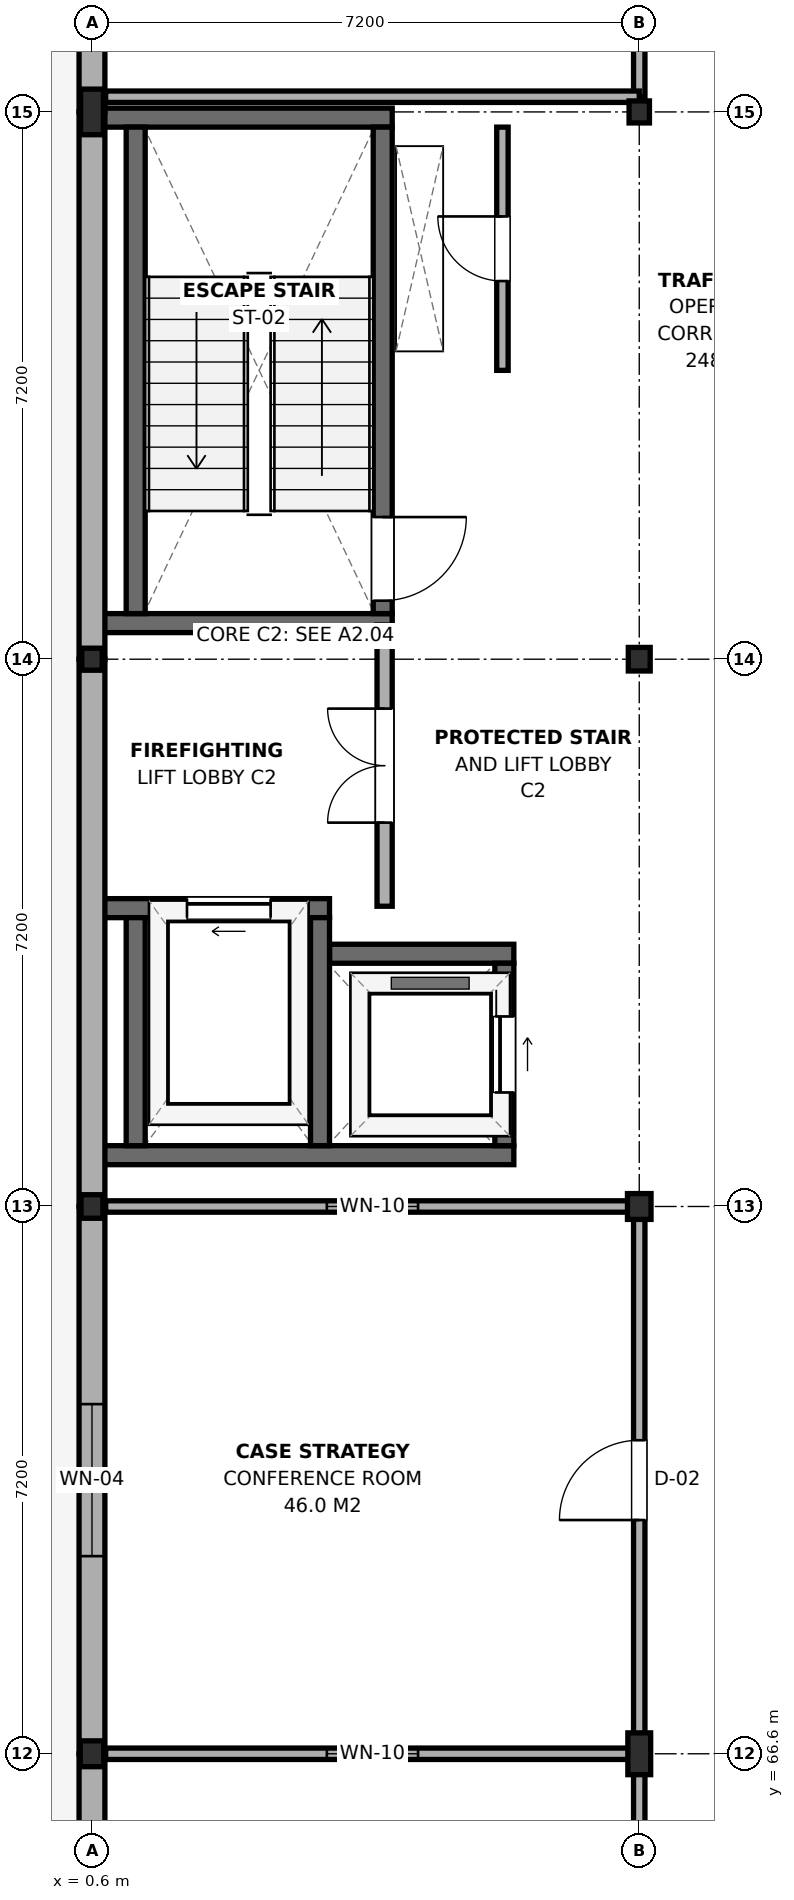
"""IFC4 building model, lengths in metres.
Left out: names, types, materials, properties, quantities, classifications, styles, units other than length and angle.
Written with IfcOpenShell. Run it as: python <this file> out.ifc"""

import sys

from ifc_helpers import new_model, si_unit, direction, frame, frame_2d, origin, origin_2d, place, context, subcontext, project, spatial, rectangle, i_section, extrude, element, fill, save


model = new_model("IFC4")
c1 = context("Model", 3, precision=1e-05, world=origin(), true_north=direction((0.0, 1.0)))
c2 = subcontext(c1, "Body", "Model", "MODEL_VIEW")
j1 = project(units=[si_unit("LENGTHUNIT", "METRE"), si_unit("PLANEANGLEUNIT", "RADIAN")], contexts=[c1])
p1 = place(None, origin())
s1 = spatial("IfcSite", under=j1, at=p1, CompositionType="ELEMENT")
p2 = place(p1, origin())
s2 = spatial("IfcBuilding", under=s1, at=p2, CompositionType="ELEMENT")
p3 = place(p2, frame((0.0, 0.0, 9.0)))
s3 = spatial("IfcBuildingStorey", under=s2, at=p3, CompositionType="ELEMENT", Elevation=9.0)
p4 = place(p3, frame((0.6, 66.6, 0.0), z_axis=(0.0, 0.0, 1.0), x_axis=(1.0, 0.0, 0.0)))
e1 = element("IfcColumn", 1, at=p4, inside=s3, PredefinedType="COLUMN", context=c2, shape_type="SweptSolid", body=[
    extrude(i_section(OverallWidth=0.31, OverallDepth=0.34, WebThickness=0.021, FlangeThickness=0.039, FilletRadius=0.027, at=origin_2d()), origin(), (0.0, 0.0, 1.0), 4.2),
])
p5 = place(p3, frame((0.6, 73.8, 0.0), z_axis=(0.0, 0.0, 1.0), x_axis=(1.0, 0.0, 0.0)))
e2 = element("IfcColumn", 2, at=p5, inside=s3, PredefinedType="COLUMN", context=c2, shape_type="SweptSolid", body=[
    extrude(i_section(OverallWidth=0.288, OverallDepth=0.31, WebThickness=0.019, FlangeThickness=0.033, FilletRadius=0.024, at=origin_2d()), origin(), (0.0, 0.0, 1.0), 4.2),
])
p6 = place(p3, frame((0.6, 81.0, 0.0), z_axis=(0.0, 0.0, 1.0), x_axis=(1.0, 0.0, 0.0)))
e3 = element("IfcColumn", 3, at=p6, inside=s3, PredefinedType="COLUMN", context=c2, shape_type="SweptSolid", body=[
    extrude(i_section(OverallWidth=0.268, OverallDepth=0.29, WebThickness=0.018, FlangeThickness=0.032, FilletRadius=0.024, at=origin_2d()), origin(), (0.0, 0.0, 1.0), 4.2),
])
p7 = place(p3, frame((0.6, 88.2, 0.0), z_axis=(0.0, 0.0, 1.0), x_axis=(1.0, 0.0, 0.0)))
e4 = element("IfcColumn", 4, at=p7, inside=s3, PredefinedType="COLUMN", context=c2, shape_type="SweptSolid", body=[
    extrude(i_section(OverallWidth=0.3, OverallDepth=0.6, WebThickness=0.015, FlangeThickness=0.03, FilletRadius=0.027, at=origin_2d()), origin(), (0.0, 0.0, 1.0), 4.2),
])
p8 = place(p3, frame((7.8, 66.6, 0.0), z_axis=(0.0, 0.0, 1.0), x_axis=(1.0, 0.0, 0.0)))
e5 = element("IfcColumn", 5, at=p8, inside=s3, PredefinedType="COLUMN", context=c2, shape_type="SweptSolid", body=[
    extrude(i_section(OverallWidth=0.3, OverallDepth=0.55, WebThickness=0.015, FlangeThickness=0.029, FilletRadius=0.027, at=origin_2d()), origin(), (0.0, 0.0, 1.0), 4.2),
])
p9 = place(p3, frame((7.8, 73.8, 0.0), z_axis=(0.0, 0.0, 1.0), x_axis=(1.0, 0.0, 0.0)))
e6 = element("IfcColumn", 6, at=p9, inside=s3, PredefinedType="COLUMN", context=c2, shape_type="SweptSolid", body=[
    extrude(i_section(OverallWidth=0.31, OverallDepth=0.34, WebThickness=0.021, FlangeThickness=0.039, FilletRadius=0.027, at=origin_2d()), origin(), (0.0, 0.0, 1.0), 4.2),
])
p10 = place(p3, frame((7.8, 81.0, 0.0), z_axis=(0.0, 0.0, 1.0), x_axis=(1.0, 0.0, 0.0)))
e7 = element("IfcColumn", 7, at=p10, inside=s3, PredefinedType="COLUMN", context=c2, shape_type="SweptSolid", body=[
    extrude(i_section(OverallWidth=0.288, OverallDepth=0.31, WebThickness=0.019, FlangeThickness=0.033, FilletRadius=0.024, at=origin_2d()), origin(), (0.0, 0.0, 1.0), 4.2),
])
p11 = place(p3, frame((7.8, 88.2, 0.0), z_axis=(0.0, 0.0, 1.0), x_axis=(1.0, 0.0, 0.0)))
e8 = element("IfcColumn", 8, at=p11, inside=s3, PredefinedType="COLUMN", context=c2, shape_type="SweptSolid", body=[
    extrude(i_section(OverallWidth=0.268, OverallDepth=0.29, WebThickness=0.018, FlangeThickness=0.032, FilletRadius=0.024, at=origin_2d()), origin(), (0.0, 0.0, 1.0), 4.2),
])
for number, where, z_axis, x_axis in (
    (9, (0.75, 81.475, 0.0), (0.0, 0.0, 1.0), (1.0, 0.0, 0.0)),
    (10, (0.75, 88.125, 0.0), (0.0, 0.0, 1.0), (1.0, 0.0, 0.0)),
):
    element("IfcWall", number, at=place(p3, frame(where, z_axis=z_axis, x_axis=x_axis)), inside=s3, PredefinedType="SHEAR", context=c2, shape_type="SweptSolid", body=[
        extrude(rectangle(XDim=3.8, YDim=0.25, at=frame_2d((1.9, 0.0))), origin(), (0.0, 0.0, 1.0), 3.98),
    ])
p12 = place(p3, frame((1.175, 81.6, 0.0), z_axis=(0.0, 0.0, 1.0), x_axis=(0.0, 1.0, 0.0)))
e11 = element("IfcWall", 11, at=p12, inside=s3, PredefinedType="SHEAR", context=c2, shape_type="SweptSolid", body=[
    extrude(rectangle(XDim=6.4, YDim=0.25, at=frame_2d((3.2, 0.0))), origin(), (0.0, 0.0, 1.0), 3.98),
])
p13 = place(p3, frame((4.425, 81.6, 0.0), z_axis=(0.0, 0.0, 1.0), x_axis=(0.0, 1.0, 0.0)))
e12 = element("IfcWall", 12, at=p13, inside=s3, PredefinedType="SHEAR", context=c2, shape_type="SweptSolid", body=[
    extrude(rectangle(XDim=6.4, YDim=0.25, at=frame_2d((3.2, 0.0))), origin(), (0.0, 0.0, 1.0), 3.98),
])
p14 = place(p13, frame((0.17, 0.0, 0.0)))
e13 = element("IfcOpeningElement", 13, at=p14, cuts=e12, PredefinedType="OPENING", context=c2, shape_type="SweptSolid", body=[
    extrude(rectangle(XDim=1.1, YDim=2.15, at=frame_2d((0.55, 1.075))), frame((0.0, 0.14, 0.0), z_axis=(0.0, -1.0, 0.0), x_axis=(1.0, 0.0, 0.0)), (0.0, 0.0, 1.0), 0.28),
])
p15 = place(p3, frame((0.75, 74.475, 0.0), z_axis=(0.0, 0.0, 1.0), x_axis=(1.0, 0.0, 0.0)))
e14 = element("IfcWall", 14, at=p15, inside=s3, PredefinedType="SHEAR", context=c2, shape_type="SweptSolid", body=[
    extrude(rectangle(XDim=5.4, YDim=0.25, at=frame_2d((2.7, 0.0))), origin(), (0.0, 0.0, 1.0), 3.98),
])
p16 = place(p3, frame((0.75, 77.725, 0.0), z_axis=(0.0, 0.0, 1.0), x_axis=(1.0, 0.0, 0.0)))
e15 = element("IfcWall", 15, at=p16, inside=s3, PredefinedType="SHEAR", context=c2, shape_type="SweptSolid", body=[
    extrude(rectangle(XDim=2.975, YDim=0.25, at=frame_2d((1.488, 0.0))), origin(), (0.0, 0.0, 1.0), 3.98),
])
p17 = place(p16, frame((1.1, 0.0, 0.0)))
e16 = element("IfcOpeningElement", 16, at=p17, cuts=e15, PredefinedType="OPENING", context=c2, shape_type="SweptSolid", body=[
    extrude(rectangle(XDim=1.1, YDim=2.15, at=frame_2d((0.55, 1.075))), frame((0.0, 0.14, 0.0), z_axis=(0.0, -1.0, 0.0), x_axis=(1.0, 0.0, 0.0)), (0.0, 0.0, 1.0), 0.28),
])
p18 = place(p3, frame((3.725, 77.125, 0.0), z_axis=(0.0, 0.0, 1.0), x_axis=(1.0, 0.0, 0.0)))
e17 = element("IfcWall", 17, at=p18, inside=s3, PredefinedType="SHEAR", context=c2, shape_type="SweptSolid", body=[
    extrude(rectangle(XDim=2.425, YDim=0.25, at=frame_2d((1.212, 0.0))), origin(), (0.0, 0.0, 1.0), 3.98),
])
for number, where, z_axis, x_axis in (
    (18, (1.175, 74.6, 0.0), (0.0, 0.0, 1.0), (0.0, 1.0, 0.0)),
    (19, (3.6, 74.6, 0.0), (0.0, 0.0, 1.0), (0.0, 1.0, 0.0)),
):
    element("IfcWall", number, at=place(p3, frame(where, z_axis=z_axis, x_axis=x_axis)), inside=s3, PredefinedType="SHEAR", context=c2, shape_type="SweptSolid", body=[
        extrude(rectangle(XDim=3.0, YDim=0.25, at=frame_2d((1.5, 0.0))), origin(), (0.0, 0.0, 1.0), 3.98),
    ])
p19 = place(p3, frame((6.025, 74.6, 0.0), z_axis=(0.0, 0.0, 1.0), x_axis=(0.0, 1.0, 0.0)))
e20 = element("IfcWall", 20, at=p19, inside=s3, PredefinedType="SHEAR", context=c2, shape_type="SweptSolid", body=[
    extrude(rectangle(XDim=2.4, YDim=0.25, at=frame_2d((1.2, 0.0))), origin(), (0.0, 0.0, 1.0), 3.98),
])
p20 = place(p19, frame((0.7, 0.0, 0.0)))
e21 = element("IfcOpeningElement", 21, at=p20, cuts=e20, PredefinedType="OPENING", context=c2, shape_type="SweptSolid", body=[
    extrude(rectangle(XDim=1.0, YDim=2.15, at=frame_2d((0.5, 1.075))), frame((0.0, 0.14, 0.0), z_axis=(0.0, -1.0, 0.0), x_axis=(1.0, 0.0, 0.0)), (0.0, 0.0, 1.0), 0.28),
])
p21 = place(p3, frame((0.6, 58.8, 0.0), z_axis=(0.0, 0.0, 1.0), x_axis=(0.0, 1.0, 0.0)))
e22 = element("IfcWall", 22, at=p21, inside=s3, PredefinedType="SOLIDWALL", context=c2, shape_type="SweptSolid", body=[
    extrude(rectangle(XDim=7.8, YDim=0.34, at=frame_2d((3.9, 0.0))), origin(), (0.0, 0.0, 1.0), 3.625),
])
p22 = place(p21, frame((2.9, 0.0, 0.9)))
e23 = element("IfcOpeningElement", 23, at=p22, cuts=e22, PredefinedType="OPENING", context=c2, shape_type="SweptSolid", body=[
    extrude(rectangle(XDim=2.0, YDim=1.8, at=frame_2d((1.0, 0.9))), frame((0.0, 0.185, 0.0), z_axis=(0.0, -1.0, 0.0), x_axis=(1.0, 0.0, 0.0)), (0.0, 0.0, 1.0), 0.37),
])
p23 = place(p3, frame((0.6, 66.6, 0.0), z_axis=(0.0, 0.0, 1.0), x_axis=(0.0, 1.0, 0.0)))
e24 = element("IfcWall", 24, at=p23, inside=s3, PredefinedType="SOLIDWALL", context=c2, shape_type="SweptSolid", body=[
    extrude(rectangle(XDim=7.2, YDim=0.34, at=frame_2d((3.6, 0.0))), origin(), (0.0, 0.0, 1.0), 3.375),
])
p24 = place(p23, frame((2.6, 0.0, 0.9)))
e25 = element("IfcOpeningElement", 25, at=p24, cuts=e24, PredefinedType="OPENING", context=c2, shape_type="SweptSolid", body=[
    extrude(rectangle(XDim=2.0, YDim=1.8, at=frame_2d((1.0, 0.9))), frame((0.0, 0.185, 0.0), z_axis=(0.0, -1.0, 0.0), x_axis=(1.0, 0.0, 0.0)), (0.0, 0.0, 1.0), 0.37),
])
for number, where, z_axis, x_axis in (
    (26, (0.6, 73.8, 0.0), (0.0, 0.0, 1.0), (0.0, 1.0, 0.0)),
    (27, (0.6, 81.0, 0.0), (0.0, 0.0, 1.0), (0.0, 1.0, 0.0)),
):
    element("IfcWall", number, at=place(p3, frame(where, z_axis=z_axis, x_axis=x_axis)), inside=s3, PredefinedType="SOLIDWALL", context=c2, shape_type="SweptSolid", body=[
        extrude(rectangle(XDim=7.2, YDim=0.34, at=frame_2d((3.6, 0.0))), origin(), (0.0, 0.0, 1.0), 3.375),
    ])
p25 = place(p3, frame((0.6, 88.2, 0.0), z_axis=(0.0, 0.0, 1.0), x_axis=(0.0, 1.0, 0.0)))
e28 = element("IfcWall", 28, at=p25, inside=s3, PredefinedType="SOLIDWALL", context=c2, shape_type="SweptSolid", body=[
    extrude(rectangle(XDim=7.8, YDim=0.34, at=frame_2d((3.9, 0.0))), origin(), (0.0, 0.0, 1.0), 3.475),
])
p26 = place(p3, frame((4.45, 77.75, 0.0), z_axis=(0.0, 0.0, 1.0), x_axis=(0.0, 1.0, 0.0)))
e29 = element("IfcWall", 29, at=p26, inside=s3, PredefinedType="PARTITIONING", context=c2, shape_type="SweptSolid", body=[
    extrude(rectangle(XDim=3.7, YDim=0.2, at=frame_2d((1.85, 0.0))), origin(), (0.0, 0.0, 1.0), 3.425),
])
p27 = place(p26, frame((1.1, 0.0, 0.0)))
e30 = element("IfcOpeningElement", 30, at=p27, cuts=e29, PredefinedType="OPENING", context=c2, shape_type="SweptSolid", body=[
    extrude(rectangle(XDim=1.5, YDim=2.15, at=frame_2d((0.75, 1.075))), frame((0.0, 0.115, 0.0), z_axis=(0.0, -1.0, 0.0), x_axis=(1.0, 0.0, 0.0)), (0.0, 0.0, 1.0), 0.23),
])
p28 = place(p3, frame((6.0, 84.8, 0.0), z_axis=(0.0, 0.0, 1.0), x_axis=(0.0, 1.0, 0.0)))
e31 = element("IfcWall", 31, at=p28, inside=s3, PredefinedType="PARTITIONING", context=c2, shape_type="SweptSolid", body=[
    extrude(rectangle(XDim=3.2, YDim=0.15, at=frame_2d((1.6, 0.0))), origin(), (0.0, 0.0, 1.0), 3.625),
])
p29 = place(p28, frame((1.175, 0.0, 0.0)))
e32 = element("IfcOpeningElement", 32, at=p29, cuts=e31, PredefinedType="OPENING", context=c2, shape_type="SweptSolid", body=[
    extrude(rectangle(XDim=0.85, YDim=2.1, at=frame_2d((0.425, 1.05))), frame((0.0, 0.09, 0.0), z_axis=(0.0, -1.0, 0.0), x_axis=(1.0, 0.0, 0.0)), (0.0, 0.0, 1.0), 0.18),
])
p30 = place(p3, frame((7.8, 40.0, 0.0), z_axis=(0.0, 0.0, 1.0), x_axis=(0.0, 1.0, 0.0)))
e33 = element("IfcWall", 33, at=p30, inside=s3, PredefinedType="PARTITIONING", context=c2, shape_type="SweptSolid", body=[
    extrude(rectangle(XDim=26.6, YDim=0.15, at=frame_2d((13.3, 0.0))), origin(), (0.0, 0.0, 1.0), 3.375),
])
p31 = place(p30, frame((13.4, 0.0, 0.0)))
e34 = element("IfcOpeningElement", 34, at=p31, cuts=e33, PredefinedType="OPENING", context=c2, shape_type="SweptSolid", body=[
    extrude(rectangle(XDim=1.6, YDim=2.15, at=frame_2d((0.8, 1.075))), frame((0.0, 0.09, 0.0), z_axis=(0.0, -1.0, 0.0), x_axis=(1.0, 0.0, 0.0)), (0.0, 0.0, 1.0), 0.18),
])
p32 = place(p3, frame((7.8, 66.6, 0.0), z_axis=(0.0, 0.0, 1.0), x_axis=(0.0, 1.0, 0.0)))
e35 = element("IfcWall", 35, at=p32, inside=s3, PredefinedType="PARTITIONING", context=c2, shape_type="SweptSolid", body=[
    extrude(rectangle(XDim=7.2, YDim=0.15, at=frame_2d((3.6, 0.0))), origin(), (0.0, 0.0, 1.0), 3.425),
])
p33 = place(p32, frame((3.075, 0.0, 0.0)))
e36 = element("IfcOpeningElement", 36, at=p33, cuts=e35, PredefinedType="OPENING", context=c2, shape_type="SweptSolid", body=[
    extrude(rectangle(XDim=1.05, YDim=2.15, at=frame_2d((0.525, 1.075))), frame((0.0, 0.09, 0.0), z_axis=(0.0, -1.0, 0.0), x_axis=(1.0, 0.0, 0.0)), (0.0, 0.0, 1.0), 0.18),
])
p34 = place(p3, frame((0.78, 66.6, 0.0), z_axis=(0.0, 0.0, 1.0), x_axis=(1.0, 0.0, 0.0)))
e37 = element("IfcWall", 37, at=p34, inside=s3, PredefinedType="PARTITIONING", context=c2, shape_type="SweptSolid", body=[
    extrude(rectangle(XDim=7.02, YDim=0.15, at=frame_2d((3.51, 0.0))), origin(), (0.0, 0.0, 1.0), 3.425),
])
p35 = place(p34, frame((2.91, 0.0, 0.95)))
e38 = element("IfcOpeningElement", 38, at=p35, cuts=e37, PredefinedType="OPENING", context=c2, shape_type="SweptSolid", body=[
    extrude(rectangle(XDim=1.2, YDim=1.5, at=frame_2d((0.6, 0.75))), frame((0.0, 0.09, 0.0), z_axis=(0.0, -1.0, 0.0), x_axis=(1.0, 0.0, 0.0)), (0.0, 0.0, 1.0), 0.18),
])
p36 = place(p3, frame((0.78, 73.8, 0.0), z_axis=(0.0, 0.0, 1.0), x_axis=(1.0, 0.0, 0.0)))
e39 = element("IfcWall", 39, at=p36, inside=s3, PredefinedType="PARTITIONING", context=c2, shape_type="SweptSolid", body=[
    extrude(rectangle(XDim=7.02, YDim=0.15, at=frame_2d((3.51, 0.0))), origin(), (0.0, 0.0, 1.0), 3.375),
])
p37 = place(p36, frame((2.91, 0.0, 0.95)))
e40 = element("IfcOpeningElement", 40, at=p37, cuts=e39, PredefinedType="OPENING", context=c2, shape_type="SweptSolid", body=[
    extrude(rectangle(XDim=1.2, YDim=1.5, at=frame_2d((0.6, 0.75))), frame((0.0, 0.09, 0.0), z_axis=(0.0, -1.0, 0.0), x_axis=(1.0, 0.0, 0.0)), (0.0, 0.0, 1.0), 0.18),
])
p38 = place(p3, frame((7.8, 88.4, 0.0), z_axis=(0.0, 0.0, 1.0), x_axis=(0.0, 1.0, 0.0)))
e41 = element("IfcWall", 41, at=p38, inside=s3, PredefinedType="PARTITIONING", context=c2, shape_type="SweptSolid", body=[
    extrude(rectangle(XDim=25.0, YDim=0.15, at=frame_2d((12.5, 0.0))), origin(), (0.0, 0.0, 1.0), 3.375),
])
p39 = place(p38, frame((11.7, 0.0, 0.0)))
e42 = element("IfcOpeningElement", 42, at=p39, cuts=e41, PredefinedType="OPENING", context=c2, shape_type="SweptSolid", body=[
    extrude(rectangle(XDim=1.6, YDim=2.15, at=frame_2d((0.8, 1.075))), frame((0.0, 0.09, 0.0), z_axis=(0.0, -1.0, 0.0), x_axis=(1.0, 0.0, 0.0)), (0.0, 0.0, 1.0), 0.18),
])
p40 = place(p38, frame((17.45, 0.0, 0.95)))
e43 = element("IfcOpeningElement", 43, at=p40, cuts=e41, PredefinedType="OPENING", context=c2, shape_type="SweptSolid", body=[
    extrude(rectangle(XDim=2.6, YDim=1.5, at=frame_2d((1.3, 0.75))), frame((0.0, 0.09, 0.0), z_axis=(0.0, -1.0, 0.0), x_axis=(1.0, 0.0, 0.0)), (0.0, 0.0, 1.0), 0.18),
])
p41 = place(p3, frame((0.78, 88.4, 0.0), z_axis=(0.0, 0.0, 1.0), x_axis=(1.0, 0.0, 0.0)))
e44 = element("IfcWall", 44, at=p41, inside=s3, PredefinedType="PARTITIONING", context=c2, shape_type="SweptSolid", body=[
    extrude(rectangle(XDim=7.02, YDim=0.15, at=frame_2d((3.51, 0.0))), origin(), (0.0, 0.0, 1.0), 3.375),
])
p42 = place(p24, origin())
e45 = element("IfcWindow", 45, at=p42, inside=s3, PartitioningType="SINGLE_PANEL", PredefinedType="WINDOW", context=c2, shape_type="SweptSolid", body=[
    extrude(rectangle(XDim=2.0, YDim=1.8, at=frame_2d((1.0, 0.9))), frame((0.0, 0.03, 0.0), z_axis=(0.0, -1.0, 0.0), x_axis=(1.0, 0.0, 0.0)), (0.0, 0.0, 1.0), 0.06),
])
fill(e25, e45)
p43 = place(p14, frame((1.1, 0.0, 0.0), z_axis=(0.0, 0.0, 1.0), x_axis=(-1.0, 0.0, 0.0)))
e46 = element("IfcDoor", 46, at=p43, inside=s3, OperationType="SINGLE_SWING_LEFT", PredefinedType="DOOR", context=c2, shape_type="SweptSolid", body=[
    extrude(rectangle(XDim=1.1, YDim=2.15, at=frame_2d((0.55, 1.075))), frame((0.0, 0.025, 0.0), z_axis=(0.0, -1.0, 0.0), x_axis=(1.0, 0.0, 0.0)), (0.0, 0.0, 1.0), 0.05),
])
fill(e13, e46)
p44 = place(p17, origin())
e47 = element("IfcDoor", 47, at=p44, inside=s3, OperationType="SLIDING_TO_LEFT", PredefinedType="DOOR", context=c2, shape_type="SweptSolid", body=[
    extrude(rectangle(XDim=1.1, YDim=2.15, at=frame_2d((0.55, 1.075))), frame((0.0, 0.025, 0.0), z_axis=(0.0, -1.0, 0.0), x_axis=(1.0, 0.0, 0.0)), (0.0, 0.0, 1.0), 0.05),
])
fill(e16, e47)
p45 = place(p20, frame((1.0, 0.0, 0.0), z_axis=(0.0, 0.0, 1.0), x_axis=(-1.0, 0.0, 0.0)))
e48 = element("IfcDoor", 48, at=p45, inside=s3, OperationType="SLIDING_TO_RIGHT", PredefinedType="DOOR", context=c2, shape_type="SweptSolid", body=[
    extrude(rectangle(XDim=1.0, YDim=2.15, at=frame_2d((0.5, 1.075))), frame((0.0, 0.025, 0.0), z_axis=(0.0, -1.0, 0.0), x_axis=(1.0, 0.0, 0.0)), (0.0, 0.0, 1.0), 0.05),
])
fill(e21, e48)
p46 = place(p27, origin())
e49 = element("IfcDoor", 49, at=p46, inside=s3, OperationType="DOUBLE_DOOR_SINGLE_SWING", PredefinedType="DOOR", context=c2, shape_type="SweptSolid", body=[
    extrude(rectangle(XDim=1.5, YDim=2.15, at=frame_2d((0.75, 1.075))), frame((0.0, 0.025, 0.0), z_axis=(0.0, -1.0, 0.0), x_axis=(1.0, 0.0, 0.0)), (0.0, 0.0, 1.0), 0.05),
])
fill(e30, e49)
p47 = place(p29, origin())
e50 = element("IfcDoor", 50, at=p47, inside=s3, OperationType="SINGLE_SWING_RIGHT", PredefinedType="DOOR", context=c2, shape_type="SweptSolid", body=[
    extrude(rectangle(XDim=0.85, YDim=2.1, at=frame_2d((0.425, 1.05))), frame((0.0, 0.025, 0.0), z_axis=(0.0, -1.0, 0.0), x_axis=(1.0, 0.0, 0.0)), (0.0, 0.0, 1.0), 0.05),
])
fill(e32, e50)
p48 = place(p33, origin())
e51 = element("IfcDoor", 51, at=p48, inside=s3, OperationType="SINGLE_SWING_LEFT", PredefinedType="DOOR", context=c2, shape_type="SweptSolid", body=[
    extrude(rectangle(XDim=1.05, YDim=2.15, at=frame_2d((0.525, 1.075))), frame((0.0, 0.025, 0.0), z_axis=(0.0, -1.0, 0.0), x_axis=(1.0, 0.0, 0.0)), (0.0, 0.0, 1.0), 0.05),
])
fill(e36, e51)
p49 = place(p35, origin())
e52 = element("IfcWindow", 52, at=p49, inside=s3, PartitioningType="SINGLE_PANEL", PredefinedType="WINDOW", context=c2, shape_type="SweptSolid", body=[
    extrude(rectangle(XDim=1.2, YDim=1.5, at=frame_2d((0.6, 0.75))), frame((0.0, 0.03, 0.0), z_axis=(0.0, -1.0, 0.0), x_axis=(1.0, 0.0, 0.0)), (0.0, 0.0, 1.0), 0.06),
])
fill(e38, e52)
p50 = place(p37, origin())
e53 = element("IfcWindow", 53, at=p50, inside=s3, PartitioningType="SINGLE_PANEL", PredefinedType="WINDOW", context=c2, shape_type="SweptSolid", body=[
    extrude(rectangle(XDim=1.2, YDim=1.5, at=frame_2d((0.6, 0.75))), frame((0.0, 0.03, 0.0), z_axis=(0.0, -1.0, 0.0), x_axis=(1.0, 0.0, 0.0)), (0.0, 0.0, 1.0), 0.06),
])
fill(e40, e53)
save(model, sys.argv[1])
